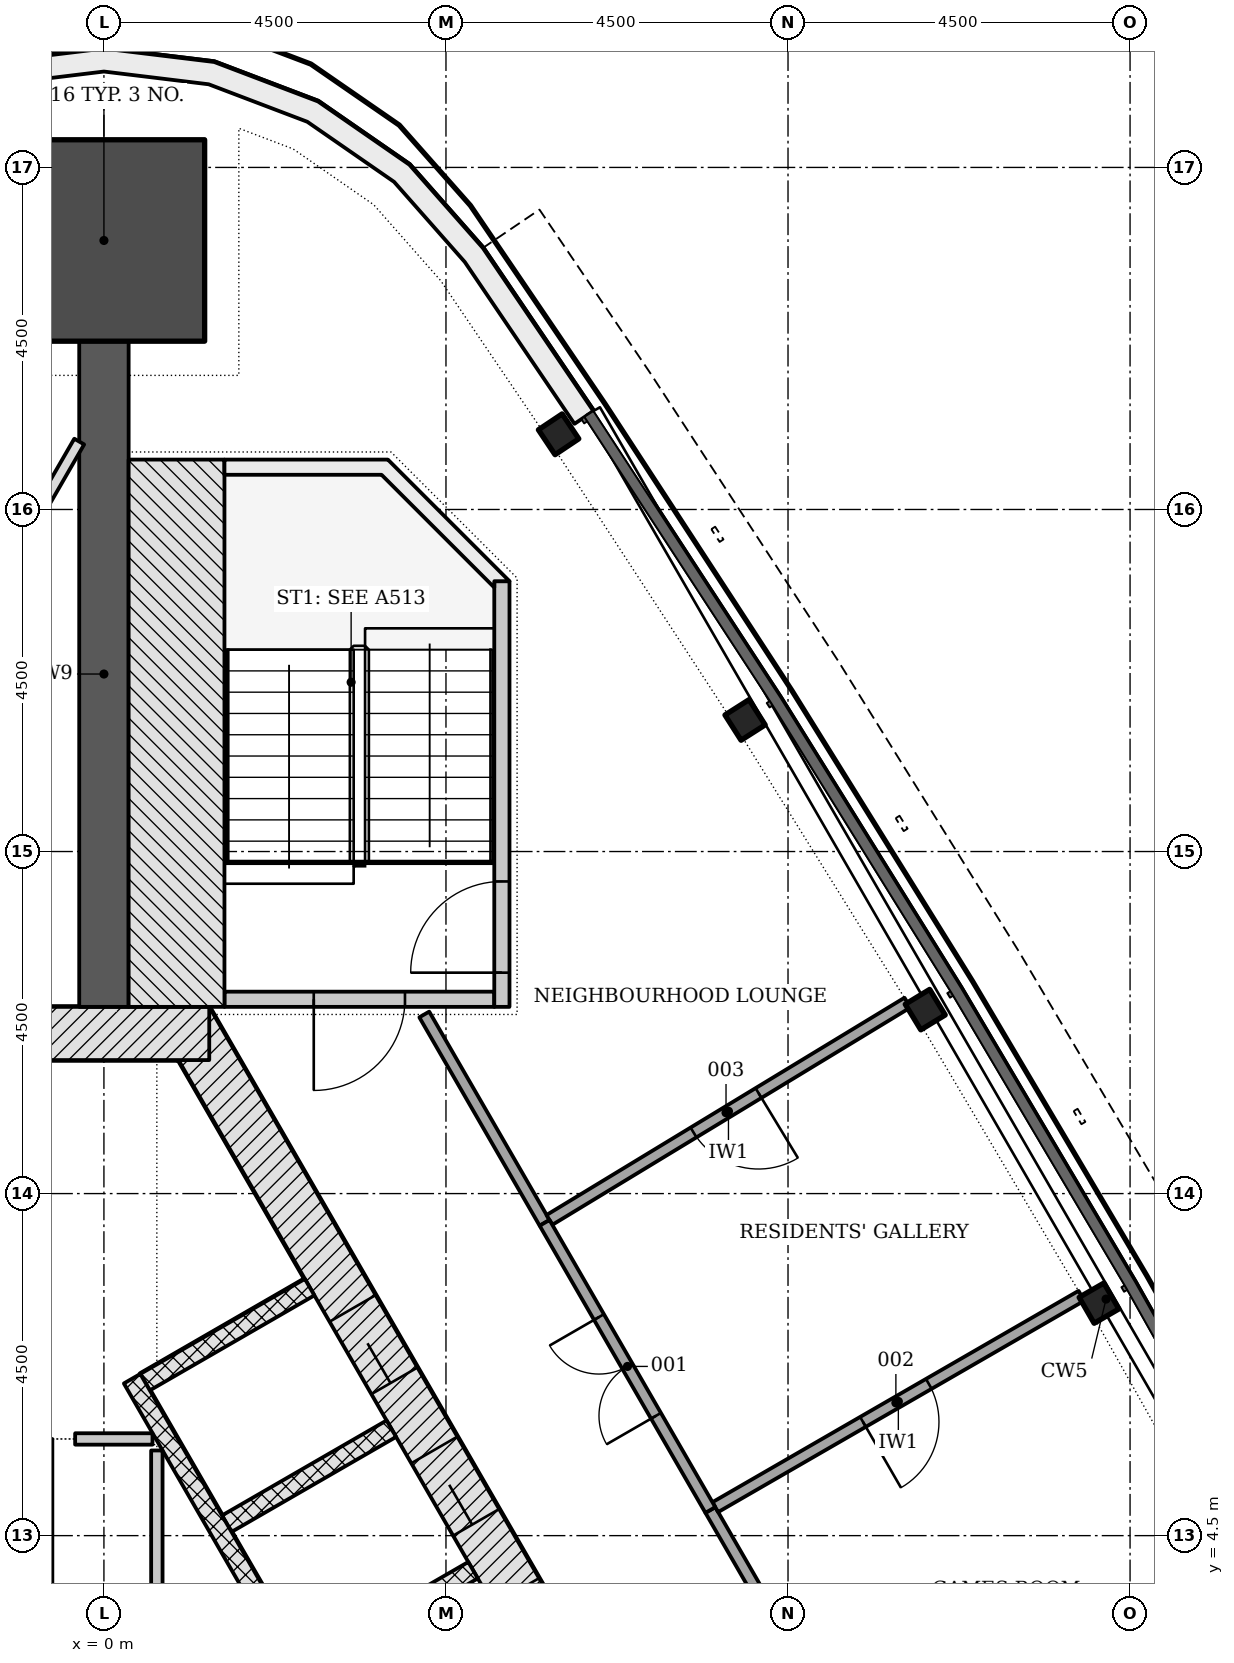
"""IFC4 building model, lengths in metres.
Left out: names, types, materials, properties, quantities, classifications, styles, units other than length and angle.
Written with IfcOpenShell. Run it as: python <this file> out.ifc"""

import sys

from ifc_helpers import new_model, si_unit, direction, frame, frame_2d, origin, origin_2d, place, context, subcontext, project, spatial, polyline, rectangle, i_section, outline, extrude, element, fill, save


model = new_model("IFC4")
c1 = context("Model", 3, precision=1e-05, world=origin(), true_north=direction((0.0, 1.0)))
c2 = subcontext(c1, "Body", "Model", "MODEL_VIEW")
j1 = project(units=[si_unit("LENGTHUNIT", "METRE"), si_unit("PLANEANGLEUNIT", "RADIAN")], contexts=[c1])
p1 = place(None, origin())
s1 = spatial("IfcSite", under=j1, at=p1, CompositionType="ELEMENT")
p2 = place(p1, origin())
s2 = spatial("IfcBuilding", under=s1, at=p2, CompositionType="ELEMENT")
p3 = place(p2, frame((0.0, 0.0, 203.1)))
s3 = spatial("IfcBuildingStorey", under=s2, at=p3, CompositionType="ELEMENT", Elevation=203.1)
p4 = place(p3, frame((10.311, -4.703, -0.2), z_axis=(0.0, 0.0, 1.0), x_axis=(-0.500001446645, 0.866024568562, 0.0)))
e1 = element("IfcWall", 1, at=p4, inside=s3, PredefinedType="SHEAR", context=c2, shape_type="SweptSolid", body=[
    extrude(rectangle(XDim=18.458, YDim=0.7, at=frame_2d((9.229, 0.0))), origin(), (0.0, 0.0, 1.0), 3.6),
])
p5 = place(p4, frame((4.379, 0.0, 0.2)))
e2 = element("IfcOpeningElement", 2, at=p5, cuts=e1, PredefinedType="OPENING", context=c2, shape_type="SweptSolid", body=[
    extrude(rectangle(XDim=1.1, YDim=2.1, at=frame_2d((0.55, 1.05))), frame((0.0, 0.36, 0.0), z_axis=(0.0, -1.0, 0.0), x_axis=(1.0, 0.0, 0.0)), (0.0, 0.0, 1.0), 0.72),
])
p6 = place(p4, frame((6.529, 0.0, 0.2)))
e3 = element("IfcOpeningElement", 3, at=p6, cuts=e1, PredefinedType="OPENING", context=c2, shape_type="SweptSolid", body=[
    extrude(rectangle(XDim=1.1, YDim=2.1, at=frame_2d((0.55, 1.05))), frame((0.0, 0.36, 0.0), z_axis=(0.0, -1.0, 0.0), x_axis=(1.0, 0.0, 0.0)), (0.0, 0.0, 1.0), 0.72),
])
p7 = place(p4, frame((8.679, 0.0, 0.2)))
e4 = element("IfcOpeningElement", 4, at=p7, cuts=e1, PredefinedType="OPENING", context=c2, shape_type="SweptSolid", body=[
    extrude(rectangle(XDim=1.1, YDim=2.1, at=frame_2d((0.55, 1.05))), frame((0.0, 0.36, 0.0), z_axis=(0.0, -1.0, 0.0), x_axis=(1.0, 0.0, 0.0)), (0.0, 0.0, 1.0), 0.72),
])
p8 = place(p4, frame((10.829, 0.0, 0.2)))
e5 = element("IfcOpeningElement", 5, at=p8, cuts=e1, PredefinedType="OPENING", context=c2, shape_type="SweptSolid", body=[
    extrude(rectangle(XDim=1.1, YDim=2.1, at=frame_2d((0.55, 1.05))), frame((0.0, 0.36, 0.0), z_axis=(0.0, -1.0, 0.0), x_axis=(1.0, 0.0, 0.0)), (0.0, 0.0, 1.0), 0.72),
])
p9 = place(p4, frame((12.979, 0.0, 0.2)))
e6 = element("IfcOpeningElement", 6, at=p9, cuts=e1, PredefinedType="OPENING", context=c2, shape_type="SweptSolid", body=[
    extrude(rectangle(XDim=1.1, YDim=2.1, at=frame_2d((0.55, 1.05))), frame((0.0, 0.36, 0.0), z_axis=(0.0, -1.0, 0.0), x_axis=(1.0, 0.0, 0.0)), (0.0, 0.0, 1.0), 0.72),
])
p10 = place(p3, frame((1.386, 11.106, -0.2), z_axis=(0.0, 0.0, 1.0), x_axis=(-1.0, 0.0, 0.0)))
e7 = element("IfcWall", 7, at=p10, inside=s3, PredefinedType="SHEAR", context=c2, shape_type="SweptSolid", body=[
    extrude(rectangle(XDim=2.771, YDim=0.7, at=frame_2d((1.386, 0.0))), origin(), (0.0, 0.0, 1.0), 3.6),
])
p11 = place(p3, frame((0.0, 11.456, -0.2), z_axis=(0.0, 0.0, 1.0), x_axis=(0.0, 1.0, 0.0)))
e8 = element("IfcWall", 8, at=p11, inside=s3, PredefinedType="SHEAR", context=c2, shape_type="SweptSolid", body=[
    extrude(rectangle(XDim=8.758, YDim=0.65, at=frame_2d((4.379, 0.0))), origin(), (0.0, 0.0, 1.0), 3.6),
])
p12 = place(p3, frame((0.0, 21.539, -0.2), z_axis=(0.0, 0.0, 1.0), x_axis=(0.0, 1.0, 0.0)))
e9 = element("IfcColumn", 9, at=p12, inside=s3, PredefinedType="COLUMN", context=c2, shape_type="SweptSolid", body=[
    extrude(rectangle(XDim=2.65, YDim=2.65, at=origin_2d()), origin(), (0.0, 0.0, 1.0), 3.6),
])
for number, where, z_axis, x_axis in (
    (10, (13.092, 7.558, -0.2), (0.0, 0.0, 1.0), (-0.5, 0.866, 0.0)),
    (11, (10.805, 11.42, -0.2), (0.0, 0.0, 1.0), (-0.519, 0.855, 0.0)),
    (12, (8.435, 15.231, -0.2), (0.0, 0.0, 1.0), (-0.537, 0.843, 0.0)),
    (13, (5.982, 18.989, -0.2), (0.0, 0.0, 1.0), (-0.556, 0.831, 0.0)),
):
    element("IfcColumn", number, at=place(p3, frame(where, z_axis=z_axis, x_axis=x_axis)), inside=s3, PredefinedType="COLUMN", context=c2, shape_type="SweptSolid", body=[
        extrude(i_section(OverallWidth=0.394, OverallDepth=0.376, WebThickness=0.017, FlangeThickness=0.028, FilletRadius=0.015, at=origin_2d()), origin(), (0.0, 0.0, 1.0), 3.6),
    ])
p13 = place(p3, origin())
e14 = element("IfcWall", 14, at=p13, inside=s3, PredefinedType="NOTDEFINED", context=c2, shape_type="SweptSolid", body=[
    extrude(outline(polyline([(6.439, 19.295), (4.985, 21.44), (4.018, 22.536), (2.817, 23.368), (1.451, 23.887), (0.0, 24.064), (-1.451, 23.887), (-2.817, 23.368), (-4.018, 22.536), (-4.985, 21.44), (-6.439, 19.295), (-6.191, 19.126), (-4.748, 21.256), (-3.817, 22.31), (-2.676, 23.1), (-1.378, 23.594), (0.0, 23.761), (1.378, 23.594), (2.676, 23.1), (3.817, 22.31), (4.748, 21.256), (6.191, 19.126), (6.439, 19.295)])), origin(), (0.0, 0.0, 1.0), 3.3),
])
for number, where, z_axis, x_axis in (
    (15, (4.856, 4.045, -0.2), (0.0, 0.0, 1.0), (-0.866, -0.5, 0.0)),
    (16, (3.781, 5.907, -0.2), (0.0, 0.0, 1.0), (-0.866, -0.5, 0.0)),
    (17, (2.706, 7.769, -0.2), (0.0, 0.0, 1.0), (-0.866, -0.5, 0.0)),
):
    element("IfcWall", number, at=place(p3, frame(where, z_axis=z_axis, x_axis=x_axis)), inside=s3, PredefinedType="PARTITIONING", context=c2, shape_type="SweptSolid", body=[
        extrude(rectangle(XDim=2.5, YDim=0.25, at=frame_2d((1.25, 0.0))), origin(), (0.0, 0.0, 1.0), 3.6),
    ])
p14 = place(p3, frame((5.87, -2.961, 0.0), z_axis=(0.0, 0.0, 1.0), x_axis=(-0.50000615651, 0.866021849293, 0.0)))
e18 = element("IfcWall", 18, at=p14, inside=s3, PredefinedType="PARTITIONING", context=c2, shape_type="SweptSolid", body=[
    extrude(rectangle(XDim=11.0, YDim=0.25, at=frame_2d((5.5, 0.0))), origin(), (0.0, 0.0, 1.0), 3.4),
])
p15 = place(p3, frame((-0.379, 5.772, 0.0), z_axis=(0.0, 0.0, 1.0), x_axis=(1.0, 0.0, 0.0)))
e19 = element("IfcWall", 19, at=p15, inside=s3, PredefinedType="PARTITIONING", context=c2, shape_type="SweptSolid", body=[
    extrude(rectangle(XDim=1.018, YDim=0.15, at=frame_2d((0.509, 0.0))), origin(), (0.0, 0.0, 1.0), 3.4),
])
p16 = place(p3, frame((0.696, -5.928, 0.0), z_axis=(0.0, 0.0, 1.0), x_axis=(0.0, 1.0, 0.0)))
e20 = element("IfcWall", 20, at=p16, inside=s3, PredefinedType="PARTITIONING", context=c2, shape_type="SweptSolid", body=[
    extrude(rectangle(XDim=11.549, YDim=0.15, at=frame_2d((5.774, 0.0))), origin(), (0.0, 0.0, 1.0), 3.4),
])
p17 = place(p16, frame((6.673, 0.0, 0.0)))
e21 = element("IfcOpeningElement", 21, at=p17, cuts=e20, PredefinedType="OPENING", context=c2, shape_type="SweptSolid", body=[
    extrude(rectangle(XDim=0.9, YDim=2.1, at=frame_2d((0.45, 1.05))), frame((0.0, 0.085, 0.0), z_axis=(0.0, -1.0, 0.0), x_axis=(1.0, 0.0, 0.0)), (0.0, 0.0, 1.0), 0.17),
])
p18 = place(p3, frame((5.135, 11.556, -0.2), z_axis=(0.0, 0.0, 1.0), x_axis=(-1.0, 0.0, 0.0)))
e22 = element("IfcWall", 22, at=p18, inside=s3, PredefinedType="SHEAR", context=c2, shape_type="SweptSolid", body=[
    extrude(rectangle(XDim=3.55, YDim=0.2, at=frame_2d((1.775, 0.0))), origin(), (0.0, 0.0, 1.0), 3.6),
])
p19 = place(p18, frame((1.175, 0.0, 0.2)))
e23 = element("IfcOpeningElement", 23, at=p19, cuts=e22, PredefinedType="OPENING", context=c2, shape_type="SweptSolid", body=[
    extrude(rectangle(XDim=1.2, YDim=2.1, at=frame_2d((0.6, 1.05))), frame((0.0, 0.11, 0.0), z_axis=(0.0, -1.0, 0.0), x_axis=(1.0, 0.0, 0.0)), (0.0, 0.0, 1.0), 0.22),
])
p20 = place(p3, frame((5.236, 11.456, -0.2), z_axis=(0.0, 0.0, 1.0), x_axis=(0.0, 1.0, 0.0)))
e24 = element("IfcWall", 24, at=p20, inside=s3, PredefinedType="SHEAR", context=c2, shape_type="SweptSolid", body=[
    extrude(rectangle(XDim=5.6, YDim=0.2, at=frame_2d((2.8, 0.0))), origin(), (0.0, 0.0, 1.0), 3.6),
])
p21 = place(p20, frame((0.45, 0.0, 0.2)))
e25 = element("IfcOpeningElement", 25, at=p21, cuts=e24, PredefinedType="OPENING", context=c2, shape_type="SweptSolid", body=[
    extrude(rectangle(XDim=1.2, YDim=2.1, at=frame_2d((0.6, 1.05))), frame((0.0, 0.11, 0.0), z_axis=(0.0, -1.0, 0.0), x_axis=(1.0, 0.0, 0.0)), (0.0, 0.0, 1.0), 0.22),
])
p22 = place(p3, frame((0.955, 11.456, -0.2), z_axis=(0.0, 0.0, 1.0), x_axis=(0.0, 1.0, 0.0)))
e26 = element("IfcWall", 26, at=p22, inside=s3, PredefinedType="SHEAR", context=c2, shape_type="SweptSolid", body=[
    extrude(rectangle(XDim=7.2, YDim=1.261, at=frame_2d((3.6, 0.0))), origin(), (0.0, 0.0, 1.0), 3.6),
])
p23 = place(p3, frame((0.0, 0.0, -0.2)))
e27 = element("IfcWall", 27, at=p23, inside=s3, PredefinedType="SHEAR", context=c2, shape_type="SweptSolid", body=[
    extrude(outline(polyline([(5.336, 17.056), (3.736, 18.656), (1.586, 18.656), (1.586, 18.456), (3.653, 18.456), (5.135, 16.974), (5.135, 17.056), (5.135, 17.056), (5.135, 17.056), (5.135, 17.056), (5.135, 17.056), (5.135, 17.056), (5.135, 17.056), (5.135, 17.056), (5.135, 17.056), (5.135, 17.056), (5.135, 17.056), (5.135, 17.056), (5.135, 17.056), (5.135, 17.056), (5.135, 17.056), (5.135, 17.056), (5.135, 17.056), (5.336, 17.056)])), origin(), (0.0, 0.0, 1.0), 3.6),
])
p24 = place(p3, frame((15.832, -8.765, 0.0), z_axis=(0.0, 0.0, 1.0), x_axis=(-0.499997377664, 0.866026917785, 0.0)))
e28 = element("IfcWall", 28, at=p24, inside=s3, PredefinedType="PARTITIONING", context=c2, shape_type="SweptSolid", body=[
    extrude(rectangle(XDim=15.707, YDim=0.15, at=frame_2d((7.854, 0.0))), origin(), (0.0, 0.0, 1.0), 2.852),
])
p25 = place(p3, frame((5.797, 8.615, 0.0), z_axis=(0.0, 0.0, 1.0), x_axis=(-0.499996172356, 0.866027613664, 0.0)))
e29 = element("IfcWall", 29, at=p25, inside=s3, PredefinedType="PARTITIONING", context=c2, shape_type="SweptSolid", body=[
    extrude(rectangle(XDim=3.166, YDim=0.15, at=frame_2d((1.583, 0.0))), origin(), (0.0, 0.0, 1.0), 3.4),
])
p26 = place(p3, frame((12.86, 7.656, 0.0), z_axis=(0.0, 0.0, 1.0), x_axis=(-0.866013784358, -0.500020124897, 0.0)))
e30 = element("IfcWall", 30, at=p26, inside=s3, PredefinedType="PARTITIONING", context=c2, shape_type="SweptSolid", body=[
    extrude(rectangle(XDim=5.561, YDim=0.15, at=frame_2d((2.781, 0.0))), origin(), (0.0, 0.0, 1.0), 3.4),
])
p27 = place(p26, frame((2.318, 0.0, 0.0)))
e31 = element("IfcOpeningElement", 31, at=p27, cuts=e30, PredefinedType="OPENING", context=c2, shape_type="SweptSolid", body=[
    extrude(rectangle(XDim=1.0, YDim=2.1, at=frame_2d((0.5, 1.05))), frame((0.0, 0.085, 0.0), z_axis=(0.0, -1.0, 0.0), x_axis=(1.0, 0.0, 0.0)), (0.0, 0.0, 1.0), 0.17),
])
p28 = place(p3, frame((10.571, 11.512, 0.0), z_axis=(0.0, 0.0, 1.0), x_axis=(-0.854873861195, -0.518835890668, 0.0)))
e32 = element("IfcWall", 32, at=p28, inside=s3, PredefinedType="PARTITIONING", context=c2, shape_type="SweptSolid", body=[
    extrude(rectangle(XDim=5.509, YDim=0.15, at=frame_2d((2.755, 0.0))), origin(), (0.0, 0.0, 1.0), 3.4),
])
p29 = place(p28, frame((2.292, 0.0, 0.0)))
e33 = element("IfcOpeningElement", 33, at=p29, cuts=e32, PredefinedType="OPENING", context=c2, shape_type="SweptSolid", body=[
    extrude(rectangle(XDim=1.0, YDim=2.1, at=frame_2d((0.5, 1.05))), frame((0.0, 0.085, 0.0), z_axis=(0.0, -1.0, 0.0), x_axis=(1.0, 0.0, 0.0)), (0.0, 0.0, 1.0), 0.17),
])
p30 = place(p3, frame((7.979, 4.837, 0.0), z_axis=(0.0, 0.0, 1.0), x_axis=(-0.500027674414, 0.866009425365, 0.0)))
e34 = element("IfcWall", 34, at=p30, inside=s3, PredefinedType="PARTITIONING", context=c2, shape_type="SweptSolid", body=[
    extrude(rectangle(XDim=4.362, YDim=0.15, at=frame_2d((2.181, 0.0))), origin(), (0.0, 0.0, 1.0), 2.852),
])
p31 = place(p30, frame((1.431, 0.0, 0.0)))
e35 = element("IfcOpeningElement", 35, at=p31, cuts=e34, PredefinedType="OPENING", context=c2, shape_type="SweptSolid", body=[
    extrude(rectangle(XDim=1.5, YDim=2.1, at=frame_2d((0.75, 1.05))), frame((0.0, 0.085, 0.0), z_axis=(0.0, -1.0, 0.0), x_axis=(1.0, 0.0, 0.0)), (0.0, 0.0, 1.0), 0.17),
])
p32 = place(p3, frame((-0.325, 18.894, 0.0), z_axis=(0.0, 0.0, 1.0), x_axis=(-0.499994868576, -0.866028366393, 0.0)))
e36 = element("IfcWall", 36, at=p32, inside=s3, PredefinedType="PARTITIONING", context=c2, shape_type="SweptSolid", body=[
    extrude(rectangle(XDim=7.654, YDim=0.15, at=frame_2d((3.827, 0.0))), origin(), (0.0, 0.0, 1.0), 2.852),
])
p33 = place(p8, origin())
e37 = element("IfcDoor", 37, at=p33, inside=s3, OperationType="DOUBLE_DOOR_SLIDING", PredefinedType="DOOR", context=c2, shape_type="SweptSolid", body=[
    extrude(rectangle(XDim=1.1, YDim=2.1, at=frame_2d((0.55, 1.05))), frame((0.0, 0.025, 0.0), z_axis=(0.0, -1.0, 0.0), x_axis=(1.0, 0.0, 0.0)), (0.0, 0.0, 1.0), 0.05),
])
fill(e5, e37)
p34 = place(p9, origin())
e38 = element("IfcDoor", 38, at=p34, inside=s3, OperationType="DOUBLE_DOOR_SLIDING", PredefinedType="DOOR", context=c2, shape_type="SweptSolid", body=[
    extrude(rectangle(XDim=1.1, YDim=2.1, at=frame_2d((0.55, 1.05))), frame((0.0, 0.025, 0.0), z_axis=(0.0, -1.0, 0.0), x_axis=(1.0, 0.0, 0.0)), (0.0, 0.0, 1.0), 0.05),
])
fill(e6, e38)
p35 = place(p19, origin())
e39 = element("IfcDoor", 39, at=p35, inside=s3, OperationType="SINGLE_SWING_RIGHT", PredefinedType="DOOR", context=c2, shape_type="SweptSolid", body=[
    extrude(rectangle(XDim=1.2, YDim=2.1, at=frame_2d((0.6, 1.05))), frame((0.0, 0.025, 0.0), z_axis=(0.0, -1.0, 0.0), x_axis=(1.0, 0.0, 0.0)), (0.0, 0.0, 1.0), 0.05),
])
fill(e23, e39)
p36 = place(p21, origin())
e40 = element("IfcDoor", 40, at=p36, inside=s3, OperationType="SINGLE_SWING_LEFT", PredefinedType="DOOR", context=c2, shape_type="SweptSolid", body=[
    extrude(rectangle(XDim=1.2, YDim=2.1, at=frame_2d((0.6, 1.05))), frame((0.0, 0.025, 0.0), z_axis=(0.0, -1.0, 0.0), x_axis=(1.0, 0.0, 0.0)), (0.0, 0.0, 1.0), 0.05),
])
fill(e25, e40)
p37 = place(p31, origin())
e41 = element("IfcDoor", 41, at=p37, inside=s3, OperationType="DOUBLE_DOOR_SINGLE_SWING", PredefinedType="DOOR", context=c2, shape_type="SweptSolid", body=[
    extrude(rectangle(XDim=1.5, YDim=2.1, at=frame_2d((0.75, 1.05))), frame((0.0, 0.025, 0.0), z_axis=(0.0, -1.0, 0.0), x_axis=(1.0, 0.0, 0.0)), (0.0, 0.0, 1.0), 0.05),
])
fill(e35, e41)
p38 = place(p27, origin())
e42 = element("IfcDoor", 42, at=p38, inside=s3, OperationType="SINGLE_SWING_RIGHT", PredefinedType="DOOR", context=c2, shape_type="SweptSolid", body=[
    extrude(rectangle(XDim=1.0, YDim=2.1, at=frame_2d((0.5, 1.05))), frame((0.0, 0.025, 0.0), z_axis=(0.0, -1.0, 0.0), x_axis=(1.0, 0.0, 0.0)), (0.0, 0.0, 1.0), 0.05),
])
fill(e31, e42)
p39 = place(p29, origin())
e43 = element("IfcDoor", 43, at=p39, inside=s3, OperationType="SINGLE_SWING_LEFT", PredefinedType="DOOR", context=c2, shape_type="SweptSolid", body=[
    extrude(rectangle(XDim=1.0, YDim=2.1, at=frame_2d((0.5, 1.05))), frame((0.0, 0.025, 0.0), z_axis=(0.0, -1.0, 0.0), x_axis=(1.0, 0.0, 0.0)), (0.0, 0.0, 1.0), 0.05),
])
fill(e33, e43)
save(model, sys.argv[1])
